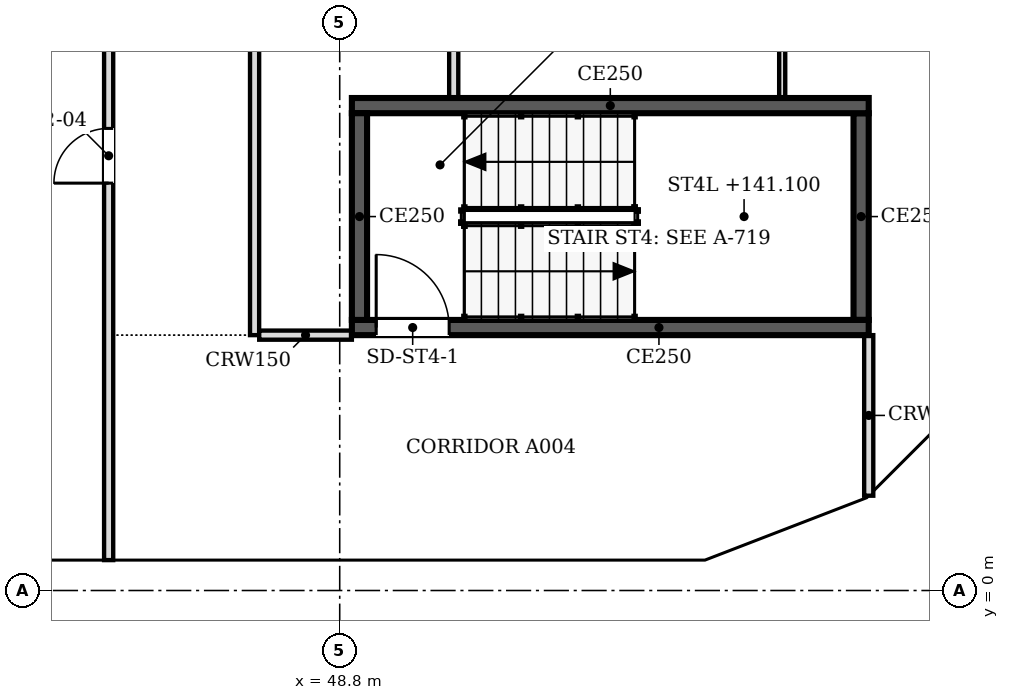
"""IFC4 building model, lengths in metres.
Left out: names, types, materials, properties, quantities, classifications, styles, units other than length and angle.
Written with IfcOpenShell. Run it as: python <this file> out.ifc"""

import sys

from ifc_helpers import new_model, si_unit, direction, frame, frame_2d, origin, place, context, subcontext, project, spatial, polyline, rectangle, outline, extrude, faceted_brep, source, transform, mapped, element, fill, save


model = new_model("IFC4")
c1 = context("Model", 3, precision=1e-05, world=origin(), true_north=direction((0.0, 1.0)))
c2 = subcontext(c1, "Body", "Model", "MODEL_VIEW")
j1 = project(units=[si_unit("LENGTHUNIT", "METRE"), si_unit("PLANEANGLEUNIT", "RADIAN")], contexts=[c1])
p1 = place(None, origin())
s1 = spatial("IfcSite", under=j1, at=p1, CompositionType="ELEMENT")
p2 = place(p1, origin())
s2 = spatial("IfcBuilding", under=s1, at=p2, CompositionType="ELEMENT")
p3 = place(p2, frame((0.0, 0.0, 139.2)))
s3 = spatial("IfcBuildingStorey", under=s2, at=p3, CompositionType="ELEMENT", Elevation=139.2)
m1 = source(origin(), c2, "Body", "SweptSolid", [
    extrude(outline(polyline([(3.05, 0.0), (6.1, 3.8), (3.05, 7.6), (0.0, 3.8), (3.05, 0.0)])), frame((0.0, 0.25, 0.0), z_axis=(0.0, -1.0, 0.0), x_axis=(1.0, 0.0, 0.0)), (0.0, 0.0, 1.0), 0.5),
])
p4 = place(p3, frame((42.7, 0.25, -3.8), z_axis=(0.0, 0.0, 1.0), x_axis=(1.0, 0.0, 0.0)))
e1 = element("IfcWall", 1, at=p4, inside=s3, PredefinedType="SOLIDWALL", context=c2, shape_type="MappedRepresentation", body=[
    mapped(m1, transform((0.0, 0.0, 0.0), scale=1.0)),
])
m2 = source(origin(), c2, "Body", "SweptSolid", [
    extrude(outline(polyline([(3.05, 0.399), (5.78, 3.8), (3.05, 7.201), (0.321, 3.8), (3.05, 0.399)])), frame((0.0, 0.26, 0.0), z_axis=(0.0, -1.0, 0.0), x_axis=(1.0, 0.0, 0.0)), (0.0, 0.0, 1.0), 0.52),
])
p5 = place(p4, origin())
e2 = element("IfcOpeningElement", 2, at=p5, cuts=e1, PredefinedType="OPENING", context=c2, shape_type="MappedRepresentation", body=[
    mapped(m2, transform((0.0, 0.0, 0.0), scale=1.0)),
])
m3 = source(origin(), c2, "Body", "Brep", [
    faceted_brep([(3.05, -0.25, 0.0), (6.053, -0.25, 3.8), (3.05, -0.25, 7.6), (0.0, -0.25, 3.8), (0.0, 0.25, 3.8), (3.05, 0.25, 7.6), (6.007, 0.25, 3.859), (6.007, 0.25, 3.741), (3.05, 0.25, 0.0), (6.053, 0.0, 3.8)], [[[0, 1, 2, 3]], [[4, 5, 6, 7, 8]], [[8, 7, 9, 1, 0]], [[6, 5, 2, 1, 9]], [[5, 4, 3, 2]], [[4, 8, 0, 3]], [[9, 7, 6]]]),
])
p6 = place(p3, frame((48.8, 0.25, -3.8), z_axis=(0.0, 0.0, 1.0), x_axis=(1.0, 0.0, 0.0)))
e3 = element("IfcWall", 3, at=p6, inside=s3, PredefinedType="SOLIDWALL", context=c2, shape_type="MappedRepresentation", body=[
    mapped(m3, transform((0.0, 0.0, 0.0), scale=1.0)),
])
m4 = source(origin(), c2, "Body", "SweptSolid", [
    extrude(outline(polyline([(3.049, 0.401), (5.735, 3.8), (3.049, 7.199), (0.321, 3.8), (3.049, 0.401)])), frame((0.0, 0.26, 0.0), z_axis=(0.0, -1.0, 0.0), x_axis=(1.0, 0.0, 0.0)), (0.0, 0.0, 1.0), 0.52),
])
p7 = place(p6, origin())
e4 = element("IfcOpeningElement", 4, at=p7, cuts=e3, PredefinedType="OPENING", context=c2, shape_type="MappedRepresentation", body=[
    mapped(m4, transform((0.0, 0.0, 0.0), scale=1.0)),
])
m5 = source(origin(), c2, "Body", "Brep", [
    faceted_brep([(2.95, -0.25, 0.0), (3.003, -0.25, 0.068), (3.003, -0.25, 7.532), (2.95, -0.25, 7.6), (0.0, -0.25, 3.8), (0.047, 0.25, 3.86), (2.898, 0.25, 7.532), (2.898, 0.25, 0.068), (0.047, 0.25, 3.74), (2.95, 0.0, 0.0), (2.95, 0.0, 7.6), (0.0, 0.0, 3.8)], [[[0, 1, 2, 3, 4]], [[5, 6, 7, 8]], [[1, 0, 9]], [[10, 3, 2]], [[6, 5, 11, 4, 3, 10]], [[8, 7, 9, 0, 4, 11]], [[8, 11, 5]], [[1, 9, 7, 6, 10, 2]]]),
])
p8 = place(p3, frame((54.854, 0.25, -3.8), z_axis=(0.0, 0.0, 1.0), x_axis=(0.932970071518, 0.359953949349, 0.0)))
e5 = element("IfcWall", 5, at=p8, inside=s3, PredefinedType="SOLIDWALL", context=c2, shape_type="MappedRepresentation", body=[
    mapped(m5, transform((0.0, 0.0, 0.0), scale=1.0)),
])
m6 = source(origin(), c2, "Body", "SweptSolid", [
    extrude(outline(polyline([(2.75, 6.935), (0.316, 3.8), (2.75, 0.665), (2.75, 6.935)])), frame((0.0, 0.26, 0.0), z_axis=(0.0, -1.0, 0.0), x_axis=(1.0, 0.0, 0.0)), (0.0, 0.0, 1.0), 0.52),
])
p9 = place(p8, origin())
e6 = element("IfcOpeningElement", 6, at=p9, cuts=e5, PredefinedType="OPENING", context=c2, shape_type="MappedRepresentation", body=[
    mapped(m6, transform((0.0, 0.0, 0.0), scale=1.0)),
])
m7 = source(origin(), c2, "Body", "Brep", [
    faceted_brep([(0.053, -0.25, 0.0), (2.997, -0.25, 3.8), (0.053, -0.25, 7.6), (0.0, -0.25, 7.532), (0.0, -0.25, 0.068), (0.106, 0.25, 7.532), (2.944, 0.25, 3.868), (2.944, 0.25, 3.732), (0.106, 0.25, 0.068), (2.997, 0.0, 3.8), (0.053, 0.0, 0.0), (0.053, 0.0, 7.6)], [[[0, 1, 2, 3, 4]], [[5, 6, 7, 8]], [[8, 7, 9, 1, 0, 10]], [[6, 5, 11, 2, 1, 9]], [[3, 2, 11]], [[10, 0, 4]], [[8, 10, 4, 3, 11, 5]], [[9, 7, 6]]]),
])
p10 = place(p3, frame((57.569, 1.274, -3.8), z_axis=(0.0, 0.0, 1.0), x_axis=(0.707066050402, 0.707147509625, 0.0)))
e7 = element("IfcWall", 7, at=p10, inside=s3, PredefinedType="SOLIDWALL", context=c2, shape_type="MappedRepresentation", body=[
    mapped(m7, transform((0.0, 0.0, 0.0), scale=1.0)),
])
m8 = source(origin(), c2, "Body", "SweptSolid", [
    extrude(outline(polyline([(0.253, 0.667), (2.681, 3.8), (0.253, 6.934), (0.253, 0.667)])), frame((0.0, 0.26, 0.0), z_axis=(0.0, -1.0, 0.0), x_axis=(1.0, 0.0, 0.0)), (0.0, 0.0, 1.0), 0.52),
])
p11 = place(p10, origin())
e8 = element("IfcOpeningElement", 8, at=p11, cuts=e7, PredefinedType="OPENING", context=c2, shape_type="MappedRepresentation", body=[
    mapped(m8, transform((0.0, 0.0, 0.0), scale=1.0)),
])
p12 = place(p2, frame((0.0, 0.0, 143.0)))
s4 = spatial("IfcBuildingStorey", under=s2, at=p12, CompositionType="ELEMENT", Elevation=143.0)
p13 = place(p12, frame((39.65, 0.25, -3.8), z_axis=(0.0, 0.0, 1.0), x_axis=(1.0, 0.0, 0.0)))
e9 = element("IfcWall", 9, at=p13, inside=s4, PredefinedType="SOLIDWALL", context=c2, shape_type="MappedRepresentation", body=[
    mapped(m1, transform((0.0, 0.0, 0.0), scale=1.0)),
])
p14 = place(p13, origin())
e10 = element("IfcOpeningElement", 10, at=p14, cuts=e9, PredefinedType="OPENING", context=c2, shape_type="MappedRepresentation", body=[
    mapped(m2, transform((0.0, 0.0, 0.0), scale=1.0)),
])
p15 = place(p12, frame((45.75, 0.25, -3.8), z_axis=(0.0, 0.0, 1.0), x_axis=(1.0, 0.0, 0.0)))
e11 = element("IfcWall", 11, at=p15, inside=s4, PredefinedType="SOLIDWALL", context=c2, shape_type="MappedRepresentation", body=[
    mapped(m1, transform((0.0, 0.0, 0.0), scale=1.0)),
])
p16 = place(p15, origin())
e12 = element("IfcOpeningElement", 12, at=p16, cuts=e11, PredefinedType="OPENING", context=c2, shape_type="MappedRepresentation", body=[
    mapped(m2, transform((0.0, 0.0, 0.0), scale=1.0)),
])
m9 = source(origin(), c2, "Body", "Brep", [
    faceted_brep([(3.003, -0.25, 0.0), (3.05, -0.25, 0.06), (3.05, -0.25, 7.54), (3.003, -0.25, 7.6), (0.0, -0.25, 3.8), (0.0, 0.25, 3.8), (2.957, 0.25, 7.541), (2.957, 0.25, 0.059), (3.003, 0.0, 0.0), (3.003, 0.0, 7.6)], [[[0, 1, 2, 3, 4]], [[5, 6, 7]], [[1, 0, 8]], [[9, 3, 2]], [[6, 5, 4, 3, 9]], [[5, 7, 8, 0, 4]], [[1, 8, 7, 6, 9, 2]]]),
])
p17 = place(p12, frame((51.85, 0.25, -3.8), z_axis=(0.0, 0.0, 1.0), x_axis=(1.0, 0.0, 0.0)))
e13 = element("IfcWall", 13, at=p17, inside=s4, PredefinedType="SOLIDWALL", context=c2, shape_type="MappedRepresentation", body=[
    mapped(m9, transform((0.0, 0.0, 0.0), scale=1.0)),
])
m10 = source(origin(), c2, "Body", "SweptSolid", [
    extrude(outline(polyline([(2.803, 6.944), (0.319, 3.8), (2.803, 0.656), (2.803, 6.944)])), frame((0.0, 0.26, 0.0), z_axis=(0.0, -1.0, 0.0), x_axis=(1.0, 0.0, 0.0)), (0.0, 0.0, 1.0), 0.52),
])
p18 = place(p17, origin())
e14 = element("IfcOpeningElement", 14, at=p18, cuts=e13, PredefinedType="OPENING", context=c2, shape_type="MappedRepresentation", body=[
    mapped(m10, transform((0.0, 0.0, 0.0), scale=1.0)),
])
m11 = source(origin(), c2, "Body", "Brep", [
    faceted_brep([(0.047, -0.25, 0.0), (2.997, -0.25, 3.8), (0.047, -0.25, 7.6), (0.0, -0.25, 7.541), (0.0, -0.25, 0.059), (0.093, 0.25, 7.54), (2.944, 0.25, 3.868), (2.944, 0.25, 3.732), (0.093, 0.25, 0.06), (2.997, 0.0, 3.8), (0.047, 0.0, 0.0), (0.047, 0.0, 7.6)], [[[0, 1, 2, 3, 4]], [[5, 6, 7, 8]], [[8, 7, 9, 1, 0, 10]], [[6, 5, 11, 2, 1, 9]], [[3, 2, 11]], [[10, 0, 4]], [[8, 10, 4, 3, 11, 5]], [[9, 7, 6]]]),
])
p19 = place(p12, frame((54.81, 0.233, -3.8), z_axis=(0.0, 0.0, 1.0), x_axis=(0.932990326376, 0.359901446078, 0.0)))
e15 = element("IfcWall", 15, at=p19, inside=s4, PredefinedType="SOLIDWALL", context=c2, shape_type="MappedRepresentation", body=[
    mapped(m11, transform((0.0, 0.0, 0.0), scale=1.0)),
])
m12 = source(origin(), c2, "Body", "SweptSolid", [
    extrude(outline(polyline([(0.247, 0.665), (2.681, 3.8), (0.247, 6.935), (0.247, 0.665)])), frame((0.0, 0.26, 0.0), z_axis=(0.0, -1.0, 0.0), x_axis=(1.0, 0.0, 0.0)), (0.0, 0.0, 1.0), 0.52),
])
p20 = place(p19, origin())
e16 = element("IfcOpeningElement", 16, at=p20, cuts=e15, PredefinedType="OPENING", context=c2, shape_type="MappedRepresentation", body=[
    mapped(m12, transform((0.0, 0.0, 0.0), scale=1.0)),
])
m13 = source(origin(), c2, "Body", "Brep", [
    faceted_brep([(2.944, -0.25, 0.0), (2.997, -0.25, 0.068), (2.997, -0.25, 7.532), (2.944, -0.25, 7.6), (0.0, -0.25, 3.8), (0.053, 0.25, 3.868), (2.891, 0.25, 7.532), (2.891, 0.25, 0.068), (0.053, 0.25, 3.732), (2.944, 0.0, 0.0), (2.944, 0.0, 7.6), (0.0, 0.0, 3.8)], [[[0, 1, 2, 3, 4]], [[5, 6, 7, 8]], [[1, 0, 9]], [[10, 3, 2]], [[6, 5, 11, 4, 3, 10]], [[8, 7, 9, 0, 4, 11]], [[8, 11, 5]], [[1, 9, 7, 6, 10, 2]]]),
])
p21 = place(p12, frame((57.606, 1.312, -3.8), z_axis=(0.0, 0.0, 1.0), x_axis=(0.707147509625, 0.707066050402, 0.0)))
e17 = element("IfcWall", 17, at=p21, inside=s4, PredefinedType="SOLIDWALL", context=c2, shape_type="MappedRepresentation", body=[
    mapped(m13, transform((0.0, 0.0, 0.0), scale=1.0)),
])
m14 = source(origin(), c2, "Body", "SweptSolid", [
    extrude(outline(polyline([(2.744, 6.934), (0.316, 3.8), (2.744, 0.666), (2.744, 6.934)])), frame((0.0, 0.26, 0.0), z_axis=(0.0, -1.0, 0.0), x_axis=(1.0, 0.0, 0.0)), (0.0, 0.0, 1.0), 0.52),
])
p22 = place(p21, origin())
e18 = element("IfcOpeningElement", 18, at=p22, cuts=e17, PredefinedType="OPENING", context=c2, shape_type="MappedRepresentation", body=[
    mapped(m14, transform((0.0, 0.0, 0.0), scale=1.0)),
])
p23 = place(p3, frame((57.5, 4.325, 0.0), z_axis=(0.0, 0.0, 1.0), x_axis=(-1.0, 0.0, 0.0)))
e19 = element("IfcWall", 19, at=p23, inside=s3, PredefinedType="SOLIDWALL", context=c2, shape_type="SweptSolid", body=[
    extrude(rectangle(XDim=8.5, YDim=0.25, at=frame_2d((4.25, 0.0))), origin(), (0.0, 0.0, 1.0), 3.8),
])
m15 = source(origin(), c2, "Body", "SweptSolid", [
    extrude(rectangle(XDim=1.2, YDim=2.1, at=frame_2d((0.6, 1.05))), frame((0.0, 0.135, 0.0), z_axis=(0.0, -1.0, 0.0), x_axis=(1.0, 0.0, 0.0)), (0.0, 0.0, 1.0), 0.27),
])
p24 = place(p23, frame((6.9, 0.0, 0.0)))
e20 = element("IfcOpeningElement", 20, at=p24, cuts=e19, PredefinedType="OPENING", context=c2, shape_type="MappedRepresentation", body=[
    mapped(m15, transform((0.0, 0.0, 0.0), scale=1.0)),
])
p25 = place(p3, frame((49.125, 4.45, 0.0), z_axis=(0.0, 0.0, 1.0), x_axis=(0.0, 1.0, 0.0)))
e21 = element("IfcWall", 21, at=p25, inside=s3, PredefinedType="SOLIDWALL", context=c2, shape_type="SweptSolid", body=[
    extrude(rectangle(XDim=3.4, YDim=0.25, at=frame_2d((1.7, 0.0))), origin(), (0.0, 0.0, 1.0), 3.8),
])
p26 = place(p3, frame((49.0, 7.975, 0.0), z_axis=(0.0, 0.0, 1.0), x_axis=(1.0, 0.0, 0.0)))
e22 = element("IfcWall", 22, at=p26, inside=s3, PredefinedType="SOLIDWALL", context=c2, shape_type="SweptSolid", body=[
    extrude(rectangle(XDim=8.5, YDim=0.25, at=frame_2d((4.25, 0.0))), origin(), (0.0, 0.0, 1.0), 3.8),
])
p27 = place(p3, frame((57.375, 7.85, 0.0), z_axis=(0.0, 0.0, 1.0), x_axis=(0.0, -1.0, 0.0)))
e23 = element("IfcWall", 23, at=p27, inside=s3, PredefinedType="SOLIDWALL", context=c2, shape_type="SweptSolid", body=[
    extrude(rectangle(XDim=3.4, YDim=0.25, at=frame_2d((1.7, 0.0))), origin(), (0.0, 0.0, 1.0), 3.8),
])
p28 = place(p3, frame((45.0, 0.5, 0.0), z_axis=(0.0, 0.0, 1.0), x_axis=(0.0, 1.0, 0.0)))
e24 = element("IfcWall", 24, at=p28, inside=s3, PredefinedType="PARTITIONING", context=c2, shape_type="SweptSolid", body=[
    extrude(rectangle(XDim=21.724, YDim=0.15, at=frame_2d((10.862, 0.0))), origin(), (0.0, 0.0, 1.0), 3.067),
])
m16 = source(origin(), c2, "Body", "SweptSolid", [
    extrude(rectangle(XDim=0.9, YDim=2.1, at=frame_2d((0.45, 1.05))), frame((0.0, 0.085, 0.0), z_axis=(0.0, -1.0, 0.0), x_axis=(1.0, 0.0, 0.0)), (0.0, 0.0, 1.0), 0.17),
])
p29 = place(p28, frame((6.2, 0.0, 0.0)))
e25 = element("IfcOpeningElement", 25, at=p29, cuts=e24, PredefinedType="OPENING", context=c2, shape_type="MappedRepresentation", body=[
    mapped(m16, transform((0.0, 0.0, 0.0), scale=1.0)),
])
p30 = place(p28, frame((15.3, 0.0, 0.0)))
e26 = element("IfcOpeningElement", 26, at=p30, cuts=e24, PredefinedType="OPENING", context=c2, shape_type="MappedRepresentation", body=[
    mapped(m16, transform((0.0, 0.0, 0.0), scale=1.0)),
])
p31 = place(p3, frame((57.5, 1.559, 0.0), z_axis=(0.0, 0.0, 1.0), x_axis=(0.0, 1.0, 0.0)))
e27 = element("IfcWall", 27, at=p31, inside=s3, PredefinedType="PARTITIONING", context=c2, shape_type="SweptSolid", body=[
    extrude(rectangle(XDim=2.641, YDim=0.15, at=frame_2d((1.32, 0.0))), origin(), (0.0, 0.0, 1.0), 3.067),
])
p32 = place(p3, frame((47.4, 22.3, 0.0), z_axis=(0.0, 0.0, 1.0), x_axis=(0.0, -1.0, 0.0)))
e28 = element("IfcWall", 28, at=p32, inside=s3, PredefinedType="PARTITIONING", context=c2, shape_type="SweptSolid", body=[
    extrude(rectangle(XDim=18.1, YDim=0.15, at=frame_2d((9.05, 0.0))), origin(), (0.0, 0.0, 1.0), 3.067),
])
m17 = source(origin(), c2, "Body", "SweptSolid", [
    extrude(rectangle(XDim=1.0, YDim=2.1, at=frame_2d((0.5, 1.05))), frame((0.0, 0.085, 0.0), z_axis=(0.0, -1.0, 0.0), x_axis=(1.0, 0.0, 0.0)), (0.0, 0.0, 1.0), 0.17),
])
p33 = place(p32, frame((2.099, 0.0, 0.0)))
e29 = element("IfcOpeningElement", 29, at=p33, cuts=e28, PredefinedType="OPENING", context=c2, shape_type="MappedRepresentation", body=[
    mapped(m17, transform((0.0, 0.0, 0.0), scale=1.0)),
])
p34 = place(p32, frame((11.2, 0.0, 0.0)))
e30 = element("IfcOpeningElement", 30, at=p34, cuts=e28, PredefinedType="OPENING", context=c2, shape_type="MappedRepresentation", body=[
    mapped(m17, transform((0.0, 0.0, 0.0), scale=1.0)),
])
p35 = place(p3, frame((47.476, 4.2, 0.0), z_axis=(0.0, 0.0, 1.0), x_axis=(1.0, 0.0, 0.0)))
e31 = element("IfcWall", 31, at=p35, inside=s3, PredefinedType="PARTITIONING", context=c2, shape_type="SweptSolid", body=[
    extrude(rectangle(XDim=1.524, YDim=0.15, at=frame_2d((0.762, 0.0))), origin(), (0.0, 0.0, 1.0), 3.067),
])
p36 = place(p3, frame((50.675, 17.1, 0.0), z_axis=(0.0, 0.0, 1.0), x_axis=(0.0, -1.0, 0.0)))
e32 = element("IfcWall", 32, at=p36, inside=s3, PredefinedType="PARTITIONING", context=c2, shape_type="SweptSolid", body=[
    extrude(rectangle(XDim=9.0, YDim=0.15, at=frame_2d((4.5, 0.0))), origin(), (0.0, 0.0, 1.0), 3.067),
])
p37 = place(p36, frame((4.1, 0.0, 0.0)))
e33 = element("IfcOpeningElement", 33, at=p37, cuts=e32, PredefinedType="OPENING", context=c2, shape_type="MappedRepresentation", body=[
    mapped(m16, transform((0.0, 0.0, 0.0), scale=1.0)),
])
p38 = place(p3, frame((56.077, 17.024, 0.0), z_axis=(0.0, 0.0, 1.0), x_axis=(0.0, -1.0, 0.0)))
e34 = element("IfcWall", 34, at=p38, inside=s3, PredefinedType="PARTITIONING", context=c2, shape_type="SweptSolid", body=[
    extrude(rectangle(XDim=8.924, YDim=0.1, at=frame_2d((4.462, 0.0))), origin(), (0.0, 0.0, 1.0), 3.067),
])
m18 = source(origin(), c2, "Body", "SweptSolid", [
    extrude(rectangle(XDim=0.9, YDim=2.1, at=frame_2d((0.45, 1.05))), frame((0.0, 0.06, 0.0), z_axis=(0.0, -1.0, 0.0), x_axis=(1.0, 0.0, 0.0)), (0.0, 0.0, 1.0), 0.12),
])
p39 = place(p38, frame((1.608, 0.0, 0.0)))
e35 = element("IfcOpeningElement", 35, at=p39, cuts=e34, PredefinedType="OPENING", context=c2, shape_type="MappedRepresentation", body=[
    mapped(m18, transform((0.0, 0.0, 0.0), scale=1.0)),
])
p40 = place(p38, frame((6.024, 0.0, 0.0)))
e36 = element("IfcOpeningElement", 36, at=p40, cuts=e34, PredefinedType="OPENING", context=c2, shape_type="MappedRepresentation", body=[
    mapped(m18, transform((0.0, 0.0, 0.0), scale=1.0)),
])
m19 = source(origin(), c2, "Body", "SweptSolid", [
    extrude(rectangle(XDim=1.2, YDim=2.1, at=frame_2d((0.6, 1.05))), frame((0.0, 0.025, 0.0), z_axis=(0.0, -1.0, 0.0), x_axis=(1.0, 0.0, 0.0)), (0.0, 0.0, 1.0), 0.05),
])
p41 = place(p24, origin())
e37 = element("IfcDoor", 37, at=p41, inside=s3, OperationType="SINGLE_SWING_RIGHT", PredefinedType="DOOR", context=c2, shape_type="MappedRepresentation", body=[
    mapped(m19, transform((0.0, 0.0, 0.0), scale=1.0)),
])
fill(e20, e37)
m20 = source(origin(), c2, "Body", "SweptSolid", [
    extrude(rectangle(XDim=0.9, YDim=2.1, at=frame_2d((0.45, 1.05))), frame((0.0, 0.025, 0.0), z_axis=(0.0, -1.0, 0.0), x_axis=(1.0, 0.0, 0.0)), (0.0, 0.0, 1.0), 0.05),
])
p42 = place(p29, origin())
e38 = element("IfcDoor", 38, at=p42, inside=s3, OperationType="SINGLE_SWING_LEFT", PredefinedType="DOOR", context=c2, shape_type="MappedRepresentation", body=[
    mapped(m20, transform((0.0, 0.0, 0.0), scale=1.0)),
])
fill(e25, e38)
save(model, sys.argv[1])
